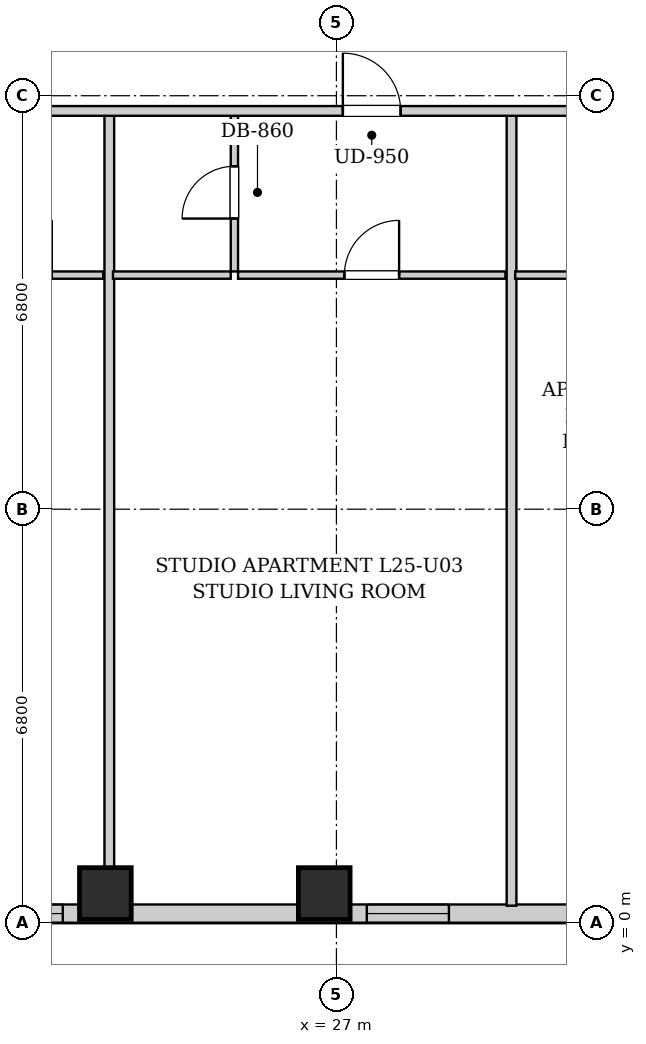
"""IFC4 building model, lengths in metres.
Left out: names, types, materials, properties, quantities, classifications, styles, units other than length and angle.
Written with IfcOpenShell. Run it as: python <this file> out.ifc"""

import sys

from ifc_helpers import new_model, si_unit, direction, frame, frame_2d, origin, origin_2d, place, context, subcontext, project, spatial, rectangle, extrude, element, fill, save


model = new_model("IFC4")
c1 = context("Model", 3, precision=1e-05, world=origin(), true_north=direction((0.0, 1.0)))
c2 = subcontext(c1, "Body", "Model", "MODEL_VIEW")
j1 = project(units=[si_unit("LENGTHUNIT", "METRE"), si_unit("PLANEANGLEUNIT", "RADIAN")], contexts=[c1])
p1 = place(None, origin())
s1 = spatial("IfcSite", under=j1, at=p1, CompositionType="ELEMENT")
p2 = place(p1, origin())
s2 = spatial("IfcBuilding", under=s1, at=p2, CompositionType="ELEMENT")
p3 = place(p2, frame((0.0, 0.0, 91.1)))
s3 = spatial("IfcBuildingStorey", under=s2, at=p3, CompositionType="ELEMENT", Elevation=91.1)
for number, where, z_axis, x_axis in (
    (1, (23.2, 0.48, 0.0), (0.0, 0.0, 1.0), (1.0, 0.0, 0.0)),
    (2, (26.8, 0.48, 0.0), (0.0, 0.0, 1.0), (1.0, 0.0, 0.0)),
):
    element("IfcColumn", number, at=place(p3, frame(where, z_axis=z_axis, x_axis=x_axis)), inside=s3, PredefinedType="COLUMN", context=c2, shape_type="SweptSolid", body=[
        extrude(rectangle(XDim=0.85, YDim=0.85, at=origin_2d()), origin(), (0.0, 0.0, 1.0), 3.2),
    ])
p4 = place(p3, frame((40.9, 0.15, 0.0), z_axis=(0.0, 0.0, 1.0), x_axis=(-1.0, 0.0, 0.0)))
e3 = element("IfcWall", 3, at=p4, inside=s3, PredefinedType="SOLIDWALL", context=c2, shape_type="SweptSolid", body=[
    extrude(rectangle(XDim=23.9, YDim=0.3, at=frame_2d((11.95, 0.0))), origin(), (0.0, 0.0, 1.0), 2.94),
])
p5 = place(p4, frame((21.045, 0.0, 0.55)))
e4 = element("IfcOpeningElement", 4, at=p5, cuts=e3, PredefinedType="OPENING", context=c2, shape_type="SweptSolid", body=[
    extrude(rectangle(XDim=1.35, YDim=1.2, at=frame_2d((0.675, 0.6))), frame((0.0, 0.16, 0.0), z_axis=(0.0, -1.0, 0.0), x_axis=(1.0, 0.0, 0.0)), (0.0, 0.0, 1.0), 0.32),
])
p6 = place(p4, frame((18.4, 0.0, 0.55)))
e5 = element("IfcOpeningElement", 5, at=p6, cuts=e3, PredefinedType="OPENING", context=c2, shape_type="SweptSolid", body=[
    extrude(rectangle(XDim=1.35, YDim=1.2, at=frame_2d((0.675, 0.6))), frame((0.0, 0.16, 0.0), z_axis=(0.0, -1.0, 0.0), x_axis=(1.0, 0.0, 0.0)), (0.0, 0.0, 1.0), 0.32),
])
p7 = place(p4, frame((12.05, 0.0, 0.55)))
e6 = element("IfcOpeningElement", 6, at=p7, cuts=e3, PredefinedType="OPENING", context=c2, shape_type="SweptSolid", body=[
    extrude(rectangle(XDim=1.35, YDim=1.2, at=frame_2d((0.675, 0.6))), frame((0.0, 0.16, 0.0), z_axis=(0.0, -1.0, 0.0), x_axis=(1.0, 0.0, 0.0)), (0.0, 0.0, 1.0), 0.32),
])
p8 = place(p4, frame((8.72, 0.0, 0.55)))
e7 = element("IfcOpeningElement", 7, at=p8, cuts=e3, PredefinedType="OPENING", context=c2, shape_type="SweptSolid", body=[
    extrude(rectangle(XDim=1.35, YDim=1.2, at=frame_2d((0.675, 0.6))), frame((0.0, 0.16, 0.0), z_axis=(0.0, -1.0, 0.0), x_axis=(1.0, 0.0, 0.0)), (0.0, 0.0, 1.0), 0.32),
])
p9 = place(p4, frame((5.563, 0.0, 0.55)))
e8 = element("IfcOpeningElement", 8, at=p9, cuts=e3, PredefinedType="OPENING", context=c2, shape_type="SweptSolid", body=[
    extrude(rectangle(XDim=1.35, YDim=1.2, at=frame_2d((0.675, 0.6))), frame((0.0, 0.16, 0.0), z_axis=(0.0, -1.0, 0.0), x_axis=(1.0, 0.0, 0.0)), (0.0, 0.0, 1.0), 0.32),
])
p10 = place(p3, frame((20.573, 10.65, 0.0), z_axis=(0.0, 0.0, 1.0), x_axis=(1.0, 0.0, 0.0)))
e9 = element("IfcWall", 9, at=p10, inside=s3, PredefinedType="PARTITIONING", context=c2, shape_type="SweptSolid", body=[
    extrude(rectangle(XDim=2.592, YDim=0.12, at=frame_2d((1.296, 0.0))), origin(), (0.0, 0.0, 1.0), 2.94),
])
p11 = place(p10, frame((0.846, 0.0, 0.0)))
e10 = element("IfcOpeningElement", 10, at=p11, cuts=e9, PredefinedType="OPENING", context=c2, shape_type="SweptSolid", body=[
    extrude(rectangle(XDim=0.9, YDim=2.05, at=frame_2d((0.45, 1.025))), frame((0.0, 0.07, 0.0), z_axis=(0.0, -1.0, 0.0), x_axis=(1.0, 0.0, 0.0)), (0.0, 0.0, 1.0), 0.14),
])
p12 = place(p3, frame((23.265, 0.28, 0.0), z_axis=(0.0, 0.0, 1.0), x_axis=(0.0, 1.0, 0.0)))
e11 = element("IfcWall", 11, at=p12, inside=s3, PredefinedType="PARTITIONING", context=c2, shape_type="SweptSolid", body=[
    extrude(rectangle(XDim=13.03, YDim=0.16, at=frame_2d((6.515, 0.0))), origin(), (0.0, 0.0, 1.0), 2.94),
])
p13 = place(p3, frame((25.322, 10.71, 0.0), z_axis=(0.0, 0.0, 1.0), x_axis=(0.0, 1.0, 0.0)))
e12 = element("IfcWall", 12, at=p13, inside=s3, PredefinedType="PARTITIONING", context=c2, shape_type="SweptSolid", body=[
    extrude(rectangle(XDim=2.6, YDim=0.12, at=frame_2d((1.3, 0.0))), origin(), (0.0, 0.0, 1.0), 2.94),
])
p14 = place(p13, frame((0.87, 0.0, 0.0)))
e13 = element("IfcOpeningElement", 13, at=p14, cuts=e12, PredefinedType="OPENING", context=c2, shape_type="SweptSolid", body=[
    extrude(rectangle(XDim=0.86, YDim=2.05, at=frame_2d((0.43, 1.025))), frame((0.0, 0.07, 0.0), z_axis=(0.0, -1.0, 0.0), x_axis=(1.0, 0.0, 0.0)), (0.0, 0.0, 1.0), 0.14),
])
p15 = place(p3, frame((23.325, 10.65, 0.0), z_axis=(0.0, 0.0, 1.0), x_axis=(1.0, 0.0, 0.0)))
e14 = element("IfcWall", 14, at=p15, inside=s3, PredefinedType="PARTITIONING", context=c2, shape_type="SweptSolid", body=[
    extrude(rectangle(XDim=1.937, YDim=0.12, at=frame_2d((0.969, 0.0))), origin(), (0.0, 0.0, 1.0), 2.94),
])
p16 = place(p3, frame((25.382, 10.65, 0.0), z_axis=(0.0, 0.0, 1.0), x_axis=(1.0, 0.0, 0.0)))
e15 = element("IfcWall", 15, at=p16, inside=s3, PredefinedType="PARTITIONING", context=c2, shape_type="SweptSolid", body=[
    extrude(rectangle(XDim=4.398, YDim=0.12, at=frame_2d((2.199, 0.0))), origin(), (0.0, 0.0, 1.0), 2.94),
])
p17 = place(p16, frame((1.749, 0.0, 0.0)))
e16 = element("IfcOpeningElement", 16, at=p17, cuts=e15, PredefinedType="OPENING", context=c2, shape_type="SweptSolid", body=[
    extrude(rectangle(XDim=0.9, YDim=2.05, at=frame_2d((0.45, 1.025))), frame((0.0, 0.07, 0.0), z_axis=(0.0, -1.0, 0.0), x_axis=(1.0, 0.0, 0.0)), (0.0, 0.0, 1.0), 0.14),
])
p18 = place(p3, frame((29.88, 0.28, 0.0), z_axis=(0.0, 0.0, 1.0), x_axis=(0.0, 1.0, 0.0)))
e17 = element("IfcWall", 17, at=p18, inside=s3, PredefinedType="PARTITIONING", context=c2, shape_type="SweptSolid", body=[
    extrude(rectangle(XDim=13.03, YDim=0.16, at=frame_2d((6.515, 0.0))), origin(), (0.0, 0.0, 1.0), 2.94),
])
p19 = place(p3, frame((29.94, 10.65, 0.0), z_axis=(0.0, 0.0, 1.0), x_axis=(1.0, 0.0, 0.0)))
e18 = element("IfcWall", 18, at=p19, inside=s3, PredefinedType="PARTITIONING", context=c2, shape_type="SweptSolid", body=[
    extrude(rectangle(XDim=2.4, YDim=0.12, at=frame_2d((1.2, 0.0))), origin(), (0.0, 0.0, 1.0), 2.94),
])
p20 = place(p3, frame((10.05, 13.35, 0.0), z_axis=(0.0, 0.0, 1.0), x_axis=(1.0, 0.0, 0.0)))
e19 = element("IfcWall", 19, at=p20, inside=s3, PredefinedType="PARTITIONING", context=c2, shape_type="SweptSolid", body=[
    extrude(rectangle(XDim=30.8, YDim=0.16, at=frame_2d((15.4, 0.0))), origin(), (0.0, 0.0, 1.0), 2.94),
])
p21 = place(p20, frame((0.62, 0.0, 0.0)))
e20 = element("IfcOpeningElement", 20, at=p21, cuts=e19, PredefinedType="OPENING", context=c2, shape_type="SweptSolid", body=[
    extrude(rectangle(XDim=0.95, YDim=2.1, at=frame_2d((0.475, 1.05))), frame((0.0, 0.09, 0.0), z_axis=(0.0, -1.0, 0.0), x_axis=(1.0, 0.0, 0.0)), (0.0, 0.0, 1.0), 0.18),
])
p22 = place(p20, frame((6.115, 0.0, 0.0)))
e21 = element("IfcOpeningElement", 21, at=p22, cuts=e19, PredefinedType="OPENING", context=c2, shape_type="SweptSolid", body=[
    extrude(rectangle(XDim=0.95, YDim=2.1, at=frame_2d((0.475, 1.05))), frame((0.0, 0.09, 0.0), z_axis=(0.0, -1.0, 0.0), x_axis=(1.0, 0.0, 0.0)), (0.0, 0.0, 1.0), 0.18),
])
p23 = place(p20, frame((17.056, 0.0, 0.0)))
e22 = element("IfcOpeningElement", 22, at=p23, cuts=e19, PredefinedType="OPENING", context=c2, shape_type="SweptSolid", body=[
    extrude(rectangle(XDim=0.95, YDim=2.1, at=frame_2d((0.475, 1.05))), frame((0.0, 0.09, 0.0), z_axis=(0.0, -1.0, 0.0), x_axis=(1.0, 0.0, 0.0)), (0.0, 0.0, 1.0), 0.18),
])
p24 = place(p20, frame((24.025, 0.0, 0.0)))
e23 = element("IfcOpeningElement", 23, at=p24, cuts=e19, PredefinedType="OPENING", context=c2, shape_type="SweptSolid", body=[
    extrude(rectangle(XDim=0.95, YDim=2.1, at=frame_2d((0.475, 1.05))), frame((0.0, 0.09, 0.0), z_axis=(0.0, -1.0, 0.0), x_axis=(1.0, 0.0, 0.0)), (0.0, 0.0, 1.0), 0.18),
])
p25 = place(p14, origin())
e24 = element("IfcDoor", 24, at=p25, inside=s3, OperationType="SINGLE_SWING_LEFT", PredefinedType="DOOR", context=c2, shape_type="SweptSolid", body=[
    extrude(rectangle(XDim=0.86, YDim=2.05, at=frame_2d((0.43, 1.025))), frame((0.0, 0.025, 0.0), z_axis=(0.0, -1.0, 0.0), x_axis=(1.0, 0.0, 0.0)), (0.0, 0.0, 1.0), 0.05),
])
fill(e13, e24)
p26 = place(p17, origin())
e25 = element("IfcDoor", 25, at=p26, inside=s3, OperationType="SINGLE_SWING_RIGHT", PredefinedType="DOOR", context=c2, shape_type="SweptSolid", body=[
    extrude(rectangle(XDim=0.9, YDim=2.05, at=frame_2d((0.45, 1.025))), frame((0.0, 0.025, 0.0), z_axis=(0.0, -1.0, 0.0), x_axis=(1.0, 0.0, 0.0)), (0.0, 0.0, 1.0), 0.05),
])
fill(e16, e25)
p27 = place(p23, origin())
e26 = element("IfcDoor", 26, at=p27, inside=s3, OperationType="SINGLE_SWING_LEFT", PredefinedType="DOOR", context=c2, shape_type="SweptSolid", body=[
    extrude(rectangle(XDim=0.95, YDim=2.1, at=frame_2d((0.475, 1.05))), frame((0.0, 0.025, 0.0), z_axis=(0.0, -1.0, 0.0), x_axis=(1.0, 0.0, 0.0)), (0.0, 0.0, 1.0), 0.05),
])
fill(e22, e26)
p28 = place(p6, origin())
e27 = element("IfcWindow", 27, at=p28, inside=s3, PartitioningType="SINGLE_PANEL", PredefinedType="WINDOW", context=c2, shape_type="SweptSolid", body=[
    extrude(rectangle(XDim=1.35, YDim=1.2, at=frame_2d((0.675, 0.6))), frame((0.0, 0.03, 0.0), z_axis=(0.0, -1.0, 0.0), x_axis=(1.0, 0.0, 0.0)), (0.0, 0.0, 1.0), 0.06),
])
fill(e5, e27)
p29 = place(p7, origin())
e28 = element("IfcWindow", 28, at=p29, inside=s3, PartitioningType="SINGLE_PANEL", PredefinedType="WINDOW", context=c2, shape_type="SweptSolid", body=[
    extrude(rectangle(XDim=1.35, YDim=1.2, at=frame_2d((0.675, 0.6))), frame((0.0, 0.03, 0.0), z_axis=(0.0, -1.0, 0.0), x_axis=(1.0, 0.0, 0.0)), (0.0, 0.0, 1.0), 0.06),
])
fill(e6, e28)
save(model, sys.argv[1])
